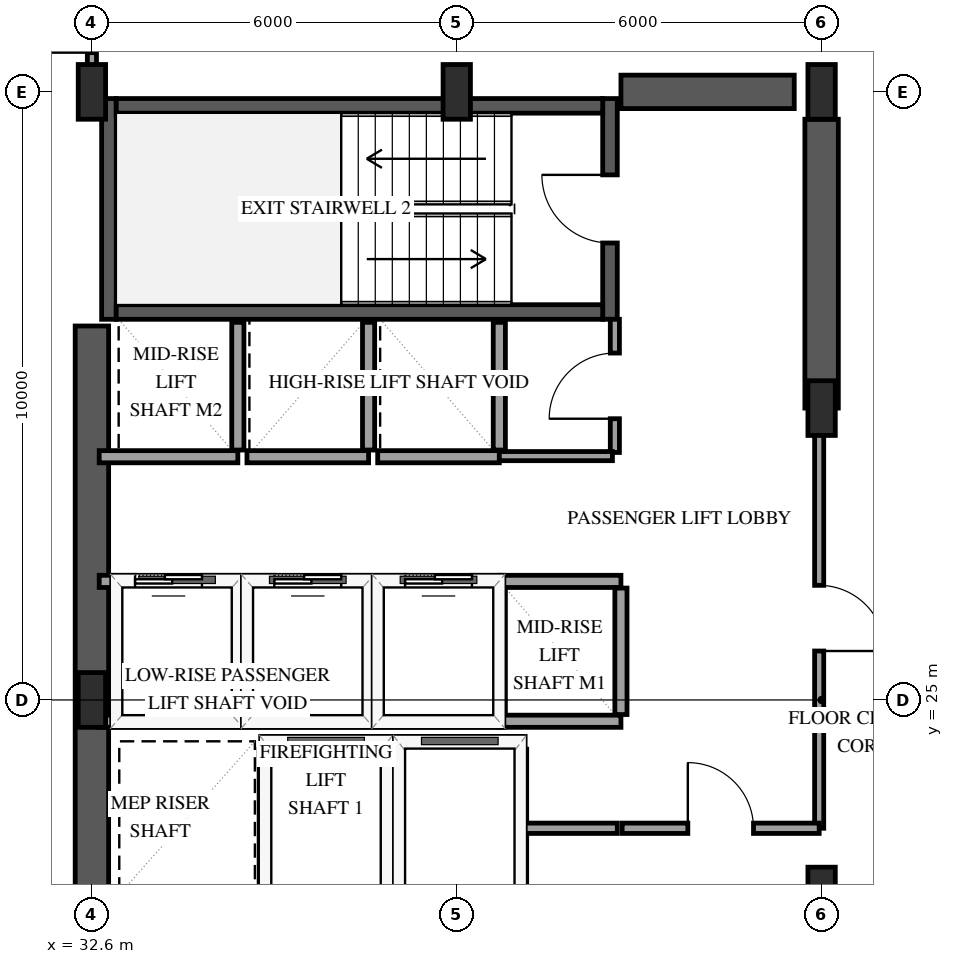
"""IFC4 building model, lengths in metres.
Left out: names, types, materials, properties, quantities, classifications, styles, units other than length and angle.
Written with IfcOpenShell. Run it as: python <this file> out.ifc"""

import sys

from ifc_helpers import new_model, si_unit, direction, frame, frame_2d, origin, origin_2d, place, context, subcontext, project, spatial, rectangle, extrude, element, fill, save


model = new_model("IFC4")
c1 = context("Model", 3, precision=1e-05, world=origin(), true_north=direction((0.0, 1.0)))
c2 = subcontext(c1, "Body", "Model", "MODEL_VIEW")
j1 = project(units=[si_unit("LENGTHUNIT", "METRE"), si_unit("PLANEANGLEUNIT", "RADIAN")], contexts=[c1])
p1 = place(None, origin())
s1 = spatial("IfcSite", under=j1, at=p1, CompositionType="ELEMENT")
p2 = place(p1, origin())
s2 = spatial("IfcBuilding", under=s1, at=p2, CompositionType="ELEMENT")
p3 = place(p2, frame((0.0, 0.0, 91.3)))
s3 = spatial("IfcBuildingStorey", under=s2, at=p3, CompositionType="ELEMENT", Elevation=91.3)
p4 = place(p3, frame((32.88, 31.26, 0.0), z_axis=(0.0, 0.0, 1.0), x_axis=(0.0, 1.0, 0.0)))
e1 = element("IfcWall", 1, at=p4, inside=s3, PredefinedType="SHEAR", context=c2, shape_type="SweptSolid", body=[
    extrude(rectangle(XDim=3.63, YDim=0.24, at=frame_2d((1.815, 0.0))), origin(), (0.0, 0.0, 1.0), 3.9),
])
p5 = place(p3, frame((41.12, 31.26, 0.0), z_axis=(0.0, 0.0, 1.0), x_axis=(0.0, 1.0, 0.0)))
e2 = element("IfcWall", 2, at=p5, inside=s3, PredefinedType="SHEAR", context=c2, shape_type="SweptSolid", body=[
    extrude(rectangle(XDim=3.63, YDim=0.24, at=frame_2d((1.815, 0.0))), origin(), (0.0, 0.0, 1.0), 3.9),
])
p6 = place(p5, frame((1.255, 0.0, 0.0)))
e3 = element("IfcOpeningElement", 3, at=p6, cuts=e2, PredefinedType="OPENING", context=c2, shape_type="SweptSolid", body=[
    extrude(rectangle(XDim=1.12, YDim=2.15, at=frame_2d((0.56, 1.075))), frame((0.0, 0.13, 0.0), z_axis=(0.0, -1.0, 0.0), x_axis=(1.0, 0.0, 0.0)), (0.0, 0.0, 1.0), 0.26),
])
for number, where, z_axis, x_axis in (
    (4, (33.0, 31.38, 0.0), (0.0, 0.0, 1.0), (1.0, 0.0, 0.0)),
    (5, (33.0, 34.77, 0.0), (0.0, 0.0, 1.0), (1.0, 0.0, 0.0)),
):
    element("IfcWall", number, at=place(p3, frame(where, z_axis=z_axis, x_axis=x_axis)), inside=s3, PredefinedType="SHEAR", context=c2, shape_type="SweptSolid", body=[
        extrude(rectangle(XDim=8.0, YDim=0.24, at=frame_2d((4.0, 0.0))), origin(), (0.0, 0.0, 1.0), 3.9),
    ])
p7 = place(p3, frame((32.6, 18.85, 0.0), z_axis=(0.0, 0.0, 1.0), x_axis=(0.0, 1.0, 0.0)))
e6 = element("IfcWall", 6, at=p7, inside=s3, PredefinedType="SHEAR", context=c2, shape_type="SweptSolid", body=[
    extrude(rectangle(XDim=12.3, YDim=0.55, at=frame_2d((6.15, 0.0))), origin(), (0.0, 0.0, 1.0), 3.9),
])
p8 = place(p3, frame((41.3, 35.0, 0.0), z_axis=(0.0, 0.0, 1.0), x_axis=(1.0, 0.0, 0.0)))
e7 = element("IfcWall", 7, at=p8, inside=s3, PredefinedType="SHEAR", context=c2, shape_type="SweptSolid", body=[
    extrude(rectangle(XDim=2.85, YDim=0.55, at=frame_2d((1.425, 0.0))), origin(), (0.0, 0.0, 1.0), 3.9),
])
p9 = place(p3, frame((44.6, 29.8, 0.0), z_axis=(0.0, 0.0, 1.0), x_axis=(0.0, 1.0, 0.0)))
e8 = element("IfcWall", 8, at=p9, inside=s3, PredefinedType="SHEAR", context=c2, shape_type="SweptSolid", body=[
    extrude(rectangle(XDim=4.75, YDim=0.55, at=frame_2d((2.375, 0.0))), origin(), (0.0, 0.0, 1.0), 3.9),
])
for number, where, z_axis, x_axis in (
    (9, (32.6, 25.0, 0.0), (0.0, 0.0, 1.0), (1.0, 0.0, 0.0)),
    (10, (32.6, 35.0, 0.0), (0.0, 0.0, 1.0), (1.0, 0.0, 0.0)),
    (11, (38.6, 35.0, 0.0), (0.0, 0.0, 1.0), (1.0, 0.0, 0.0)),
    (12, (44.6, 21.8, 0.0), (0.0, 0.0, 1.0), (1.0, 0.0, 0.0)),
    (13, (44.6, 29.8, 0.0), (0.0, 0.0, 1.0), (1.0, 0.0, 0.0)),
    (14, (44.6, 35.0, 0.0), (0.0, 0.0, 1.0), (1.0, 0.0, 0.0)),
):
    element("IfcColumn", number, at=place(p3, frame(where, z_axis=z_axis, x_axis=x_axis)), inside=s3, PredefinedType="PILASTER", context=c2, shape_type="SweptSolid", body=[
        extrude(rectangle(XDim=0.45, YDim=0.9, at=origin_2d()), origin(), (0.0, 0.0, 1.0), 3.9),
    ])
p10 = place(p3, frame((35.45, 24.3, 0.0), z_axis=(0.0, 0.0, 1.0), x_axis=(1.0, 0.0, 0.0)))
e15 = element("IfcWall", 15, at=p10, inside=s3, PredefinedType="SOLIDWALL", context=c2, shape_type="SweptSolid", body=[
    extrude(rectangle(XDim=2.0, YDim=0.2, at=frame_2d((1.0, 0.0))), origin(), (0.0, 0.0, 1.0), 3.6),
])
for number, where, z_axis, x_axis in (
    (16, (35.45, 21.81, 0.0), (0.0, 0.0, 1.0), (0.0, 1.0, 0.0)),
    (17, (37.45, 21.81, 0.0), (0.0, 0.0, 1.0), (0.0, 1.0, 0.0)),
):
    element("IfcWall", number, at=place(p3, frame(where, z_axis=z_axis, x_axis=x_axis)), inside=s3, PredefinedType="SOLIDWALL", context=c2, shape_type="SweptSolid", body=[
        extrude(rectangle(XDim=2.38, YDim=0.2, at=frame_2d((1.19, 0.0))), origin(), (0.0, 0.0, 1.0), 3.6),
    ])
p11 = place(p3, frame((37.65, 24.3, 0.0), z_axis=(0.0, 0.0, 1.0), x_axis=(1.0, 0.0, 0.0)))
e18 = element("IfcWall", 18, at=p11, inside=s3, PredefinedType="SOLIDWALL", context=c2, shape_type="SweptSolid", body=[
    extrude(rectangle(XDim=2.0, YDim=0.2, at=frame_2d((1.0, 0.0))), origin(), (0.0, 0.0, 1.0), 3.6),
])
p12 = place(p3, frame((39.65, 21.81, 0.0), z_axis=(0.0, 0.0, 1.0), x_axis=(0.0, 1.0, 0.0)))
e19 = element("IfcWall", 19, at=p12, inside=s3, PredefinedType="SOLIDWALL", context=c2, shape_type="SweptSolid", body=[
    extrude(rectangle(XDim=2.38, YDim=0.2, at=frame_2d((1.19, 0.0))), origin(), (0.0, 0.0, 1.0), 3.6),
])
p13 = place(p3, frame((32.72, 24.65, 0.0), z_axis=(0.0, 0.0, 1.0), x_axis=(1.0, 0.0, 0.0)))
e20 = element("IfcWall", 20, at=p13, inside=s3, PredefinedType="SOLIDWALL", context=c2, shape_type="SweptSolid", body=[
    extrude(rectangle(XDim=2.28, YDim=0.2, at=frame_2d((1.14, 0.0))), origin(), (0.0, 0.0, 1.0), 3.6),
])
p14 = place(p3, frame((32.72, 26.95, 0.0), z_axis=(0.0, 0.0, 1.0), x_axis=(1.0, 0.0, 0.0)))
e21 = element("IfcWall", 21, at=p14, inside=s3, PredefinedType="SOLIDWALL", context=c2, shape_type="SweptSolid", body=[
    extrude(rectangle(XDim=2.28, YDim=0.2, at=frame_2d((1.14, 0.0))), origin(), (0.0, 0.0, 1.0), 3.6),
])
p15 = place(p14, frame((0.59, 0.0, 0.0)))
e22 = element("IfcOpeningElement", 22, at=p15, cuts=e21, PredefinedType="OPENING", context=c2, shape_type="SweptSolid", body=[
    extrude(rectangle(XDim=1.1, YDim=2.15, at=frame_2d((0.55, 1.075))), frame((0.0, 0.11, 0.0), z_axis=(0.0, -1.0, 0.0), x_axis=(1.0, 0.0, 0.0)), (0.0, 0.0, 1.0), 0.22),
])
p16 = place(p3, frame((35.0, 24.76, 0.0), z_axis=(0.0, 0.0, 1.0), x_axis=(0.0, 1.0, 0.0)))
e23 = element("IfcWall", 23, at=p16, inside=s3, PredefinedType="SOLIDWALL", context=c2, shape_type="SweptSolid", body=[
    extrude(rectangle(XDim=2.08, YDim=0.2, at=frame_2d((1.04, 0.0))), origin(), (0.0, 0.0, 1.0), 3.6),
])
p17 = place(p3, frame((35.15, 24.65, 0.0), z_axis=(0.0, 0.0, 1.0), x_axis=(1.0, 0.0, 0.0)))
e24 = element("IfcWall", 24, at=p17, inside=s3, PredefinedType="SOLIDWALL", context=c2, shape_type="SweptSolid", body=[
    extrude(rectangle(XDim=2.0, YDim=0.2, at=frame_2d((1.0, 0.0))), origin(), (0.0, 0.0, 1.0), 3.6),
])
p18 = place(p3, frame((35.15, 26.95, 0.0), z_axis=(0.0, 0.0, 1.0), x_axis=(1.0, 0.0, 0.0)))
e25 = element("IfcWall", 25, at=p18, inside=s3, PredefinedType="SOLIDWALL", context=c2, shape_type="SweptSolid", body=[
    extrude(rectangle(XDim=2.0, YDim=0.2, at=frame_2d((1.0, 0.0))), origin(), (0.0, 0.0, 1.0), 3.6),
])
p19 = place(p18, frame((0.45, 0.0, 0.0)))
e26 = element("IfcOpeningElement", 26, at=p19, cuts=e25, PredefinedType="OPENING", context=c2, shape_type="SweptSolid", body=[
    extrude(rectangle(XDim=1.1, YDim=2.15, at=frame_2d((0.55, 1.075))), frame((0.0, 0.11, 0.0), z_axis=(0.0, -1.0, 0.0), x_axis=(1.0, 0.0, 0.0)), (0.0, 0.0, 1.0), 0.22),
])
p20 = place(p3, frame((37.15, 24.76, 0.0), z_axis=(0.0, 0.0, 1.0), x_axis=(0.0, 1.0, 0.0)))
e27 = element("IfcWall", 27, at=p20, inside=s3, PredefinedType="SOLIDWALL", context=c2, shape_type="SweptSolid", body=[
    extrude(rectangle(XDim=2.08, YDim=0.2, at=frame_2d((1.04, 0.0))), origin(), (0.0, 0.0, 1.0), 3.6),
])
p21 = place(p3, frame((37.3, 24.65, 0.0), z_axis=(0.0, 0.0, 1.0), x_axis=(1.0, 0.0, 0.0)))
e28 = element("IfcWall", 28, at=p21, inside=s3, PredefinedType="SOLIDWALL", context=c2, shape_type="SweptSolid", body=[
    extrude(rectangle(XDim=2.0, YDim=0.2, at=frame_2d((1.0, 0.0))), origin(), (0.0, 0.0, 1.0), 3.6),
])
p22 = place(p3, frame((37.3, 26.95, 0.0), z_axis=(0.0, 0.0, 1.0), x_axis=(1.0, 0.0, 0.0)))
e29 = element("IfcWall", 29, at=p22, inside=s3, PredefinedType="SOLIDWALL", context=c2, shape_type="SweptSolid", body=[
    extrude(rectangle(XDim=2.0, YDim=0.2, at=frame_2d((1.0, 0.0))), origin(), (0.0, 0.0, 1.0), 3.6),
])
p23 = place(p22, frame((0.45, 0.0, 0.0)))
e30 = element("IfcOpeningElement", 30, at=p23, cuts=e29, PredefinedType="OPENING", context=c2, shape_type="SweptSolid", body=[
    extrude(rectangle(XDim=1.1, YDim=2.15, at=frame_2d((0.55, 1.075))), frame((0.0, 0.11, 0.0), z_axis=(0.0, -1.0, 0.0), x_axis=(1.0, 0.0, 0.0)), (0.0, 0.0, 1.0), 0.22),
])
p24 = place(p3, frame((39.3, 24.76, 0.0), z_axis=(0.0, 0.0, 1.0), x_axis=(0.0, 1.0, 0.0)))
e31 = element("IfcWall", 31, at=p24, inside=s3, PredefinedType="SOLIDWALL", context=c2, shape_type="SweptSolid", body=[
    extrude(rectangle(XDim=2.08, YDim=0.2, at=frame_2d((1.04, 0.0))), origin(), (0.0, 0.0, 1.0), 3.6),
])
for number, where, z_axis, x_axis in (
    (32, (39.3, 24.65, 0.0), (0.0, 0.0, 1.0), (1.0, 0.0, 0.0)),
    (33, (39.3, 26.95, 0.0), (0.0, 0.0, 1.0), (1.0, 0.0, 0.0)),
):
    element("IfcWall", number, at=place(p3, frame(where, z_axis=z_axis, x_axis=x_axis)), inside=s3, PredefinedType="SOLIDWALL", context=c2, shape_type="SweptSolid", body=[
        extrude(rectangle(XDim=2.0, YDim=0.2, at=frame_2d((1.0, 0.0))), origin(), (0.0, 0.0, 1.0), 3.6),
    ])
p25 = place(p3, frame((41.3, 24.76, 0.0), z_axis=(0.0, 0.0, 1.0), x_axis=(0.0, 1.0, 0.0)))
e34 = element("IfcWall", 34, at=p25, inside=s3, PredefinedType="SOLIDWALL", context=c2, shape_type="SweptSolid", body=[
    extrude(rectangle(XDim=2.08, YDim=0.2, at=frame_2d((1.04, 0.0))), origin(), (0.0, 0.0, 1.0), 3.6),
])
p26 = place(p3, frame((32.72, 29.0, 0.0), z_axis=(0.0, 0.0, 1.0), x_axis=(1.0, 0.0, 0.0)))
e35 = element("IfcWall", 35, at=p26, inside=s3, PredefinedType="SOLIDWALL", context=c2, shape_type="SweptSolid", body=[
    extrude(rectangle(XDim=2.28, YDim=0.2, at=frame_2d((1.14, 0.0))), origin(), (0.0, 0.0, 1.0), 3.6),
])
p27 = place(p3, frame((35.0, 29.11, 0.0), z_axis=(0.0, 0.0, 1.0), x_axis=(0.0, 1.0, 0.0)))
e36 = element("IfcWall", 36, at=p27, inside=s3, PredefinedType="SOLIDWALL", context=c2, shape_type="SweptSolid", body=[
    extrude(rectangle(XDim=2.1, YDim=0.2, at=frame_2d((1.05, 0.0))), origin(), (0.0, 0.0, 1.0), 3.6),
])
p28 = place(p3, frame((35.15, 29.0, 0.0), z_axis=(0.0, 0.0, 1.0), x_axis=(1.0, 0.0, 0.0)))
e37 = element("IfcWall", 37, at=p28, inside=s3, PredefinedType="SOLIDWALL", context=c2, shape_type="SweptSolid", body=[
    extrude(rectangle(XDim=2.0, YDim=0.2, at=frame_2d((1.0, 0.0))), origin(), (0.0, 0.0, 1.0), 3.6),
])
p29 = place(p3, frame((37.15, 29.11, 0.0), z_axis=(0.0, 0.0, 1.0), x_axis=(0.0, 1.0, 0.0)))
e38 = element("IfcWall", 38, at=p29, inside=s3, PredefinedType="SOLIDWALL", context=c2, shape_type="SweptSolid", body=[
    extrude(rectangle(XDim=2.1, YDim=0.2, at=frame_2d((1.05, 0.0))), origin(), (0.0, 0.0, 1.0), 3.6),
])
p30 = place(p3, frame((37.3, 29.0, 0.0), z_axis=(0.0, 0.0, 1.0), x_axis=(1.0, 0.0, 0.0)))
e39 = element("IfcWall", 39, at=p30, inside=s3, PredefinedType="SOLIDWALL", context=c2, shape_type="SweptSolid", body=[
    extrude(rectangle(XDim=2.0, YDim=0.2, at=frame_2d((1.0, 0.0))), origin(), (0.0, 0.0, 1.0), 3.6),
])
p31 = place(p3, frame((39.3, 29.11, 0.0), z_axis=(0.0, 0.0, 1.0), x_axis=(0.0, 1.0, 0.0)))
e40 = element("IfcWall", 40, at=p31, inside=s3, PredefinedType="SOLIDWALL", context=c2, shape_type="SweptSolid", body=[
    extrude(rectangle(XDim=2.1, YDim=0.2, at=frame_2d((1.05, 0.0))), origin(), (0.0, 0.0, 1.0), 3.6),
])
p32 = place(p3, frame((44.56, 29.8, 0.0), z_axis=(0.0, 0.0, 1.0), x_axis=(0.0, -1.0, 0.0)))
e41 = element("IfcWall", 41, at=p32, inside=s3, PredefinedType="PARTITIONING", context=c2, shape_type="SweptSolid", body=[
    extrude(rectangle(XDim=6.91, YDim=0.15, at=frame_2d((3.455, 0.0))), origin(), (0.0, 0.0, 1.0), 2.64),
])
p33 = place(p32, frame((2.915, 0.0, 0.0)))
e42 = element("IfcOpeningElement", 42, at=p33, cuts=e41, PredefinedType="OPENING", context=c2, shape_type="SweptSolid", body=[
    extrude(rectangle(XDim=1.08, YDim=2.15, at=frame_2d((0.54, 1.075))), frame((0.0, 0.085, 0.0), z_axis=(0.0, -1.0, 0.0), x_axis=(1.0, 0.0, 0.0)), (0.0, 0.0, 1.0), 0.17),
])
p34 = place(p3, frame((41.32, 22.89, 0.0), z_axis=(0.0, 0.0, 1.0), x_axis=(1.0, 0.0, 0.0)))
e43 = element("IfcWall", 43, at=p34, inside=s3, PredefinedType="PARTITIONING", context=c2, shape_type="SweptSolid", body=[
    extrude(rectangle(XDim=3.24, YDim=0.17, at=frame_2d((1.62, 0.0))), origin(), (0.0, 0.0, 1.0), 3.6),
])
p35 = place(p34, frame((1.08, 0.0, 0.0)))
e44 = element("IfcOpeningElement", 44, at=p35, cuts=e43, PredefinedType="OPENING", context=c2, shape_type="SweptSolid", body=[
    extrude(rectangle(XDim=1.08, YDim=2.15, at=frame_2d((0.54, 1.075))), frame((0.0, 0.095, 0.0), z_axis=(0.0, -1.0, 0.0), x_axis=(1.0, 0.0, 0.0)), (0.0, 0.0, 1.0), 0.19),
])
p36 = place(p3, frame((41.2, 29.07, 0.0), z_axis=(0.0, 0.0, 1.0), x_axis=(0.0, 1.0, 0.0)))
e45 = element("IfcWall", 45, at=p36, inside=s3, PredefinedType="PARTITIONING", context=c2, shape_type="SweptSolid", body=[
    extrude(rectangle(XDim=2.19, YDim=0.15, at=frame_2d((1.095, 0.0))), origin(), (0.0, 0.0, 1.0), 3.6),
])
p37 = place(p36, frame((0.555, 0.0, 0.0)))
e46 = element("IfcOpeningElement", 46, at=p37, cuts=e45, PredefinedType="OPENING", context=c2, shape_type="SweptSolid", body=[
    extrude(rectangle(XDim=1.08, YDim=2.15, at=frame_2d((0.54, 1.075))), frame((0.0, 0.085, 0.0), z_axis=(0.0, -1.0, 0.0), x_axis=(1.0, 0.0, 0.0)), (0.0, 0.0, 1.0), 0.17),
])
p38 = place(p3, frame((32.6, 35.07, 0.0), z_axis=(0.0, 0.0, 1.0), x_axis=(0.0, 1.0, 0.0)))
e47 = element("IfcWall", 47, at=p38, inside=s3, PredefinedType="PARTITIONING", context=c2, shape_type="SweptSolid", body=[
    extrude(rectangle(XDim=1.91, YDim=0.15, at=frame_2d((0.955, 0.0))), origin(), (0.0, 0.0, 1.0), 3.6),
])
p39 = place(p38, frame((0.575, 0.0, 0.0)))
e48 = element("IfcOpeningElement", 48, at=p39, cuts=e47, PredefinedType="OPENING", context=c2, shape_type="SweptSolid", body=[
    extrude(rectangle(XDim=0.92, YDim=2.12, at=frame_2d((0.46, 1.06))), frame((0.0, 0.085, 0.0), z_axis=(0.0, -1.0, 0.0), x_axis=(1.0, 0.0, 0.0)), (0.0, 0.0, 1.0), 0.17),
])
p40 = place(p3, frame((39.3, 29.01, 0.0), z_axis=(0.0, 0.0, 1.0), x_axis=(1.0, 0.0, 0.0)))
e49 = element("IfcWall", 49, at=p40, inside=s3, PredefinedType="PARTITIONING", context=c2, shape_type="SweptSolid", body=[
    extrude(rectangle(XDim=1.86, YDim=0.15, at=frame_2d((0.93, 0.0))), origin(), (0.0, 0.0, 1.0), 3.6),
])
p41 = place(p3, frame((39.72, 22.89, 0.0), z_axis=(0.0, 0.0, 1.0), x_axis=(1.0, 0.0, 0.0)))
e50 = element("IfcWall", 50, at=p41, inside=s3, PredefinedType="PARTITIONING", context=c2, shape_type="SweptSolid", body=[
    extrude(rectangle(XDim=1.52, YDim=0.17, at=frame_2d((0.76, 0.0))), origin(), (0.0, 0.0, 1.0), 3.6),
])
p42 = place(p15, origin())
e51 = element("IfcDoor", 51, at=p42, inside=s3, OperationType="SLIDING_TO_LEFT", PredefinedType="DOOR", context=c2, shape_type="SweptSolid", body=[
    extrude(rectangle(XDim=1.1, YDim=2.15, at=frame_2d((0.55, 1.075))), frame((0.0, 0.025, 0.0), z_axis=(0.0, -1.0, 0.0), x_axis=(1.0, 0.0, 0.0)), (0.0, 0.0, 1.0), 0.05),
])
fill(e22, e51)
p43 = place(p19, origin())
e52 = element("IfcDoor", 52, at=p43, inside=s3, OperationType="SLIDING_TO_LEFT", PredefinedType="DOOR", context=c2, shape_type="SweptSolid", body=[
    extrude(rectangle(XDim=1.1, YDim=2.15, at=frame_2d((0.55, 1.075))), frame((0.0, 0.025, 0.0), z_axis=(0.0, -1.0, 0.0), x_axis=(1.0, 0.0, 0.0)), (0.0, 0.0, 1.0), 0.05),
])
fill(e26, e52)
p44 = place(p23, origin())
e53 = element("IfcDoor", 53, at=p44, inside=s3, OperationType="SLIDING_TO_LEFT", PredefinedType="DOOR", context=c2, shape_type="SweptSolid", body=[
    extrude(rectangle(XDim=1.1, YDim=2.15, at=frame_2d((0.55, 1.075))), frame((0.0, 0.025, 0.0), z_axis=(0.0, -1.0, 0.0), x_axis=(1.0, 0.0, 0.0)), (0.0, 0.0, 1.0), 0.05),
])
fill(e30, e53)
p45 = place(p6, origin())
e54 = element("IfcDoor", 54, at=p45, inside=s3, OperationType="SINGLE_SWING_RIGHT", PredefinedType="DOOR", context=c2, shape_type="SweptSolid", body=[
    extrude(rectangle(XDim=1.12, YDim=2.15, at=frame_2d((0.56, 1.075))), frame((0.0, 0.025, 0.0), z_axis=(0.0, -1.0, 0.0), x_axis=(1.0, 0.0, 0.0)), (0.0, 0.0, 1.0), 0.05),
])
fill(e3, e54)
p46 = place(p33, origin())
e55 = element("IfcDoor", 55, at=p46, inside=s3, OperationType="SINGLE_SWING_RIGHT", PredefinedType="DOOR", context=c2, shape_type="SweptSolid", body=[
    extrude(rectangle(XDim=1.08, YDim=2.15, at=frame_2d((0.54, 1.075))), frame((0.0, 0.025, 0.0), z_axis=(0.0, -1.0, 0.0), x_axis=(1.0, 0.0, 0.0)), (0.0, 0.0, 1.0), 0.05),
])
fill(e42, e55)
p47 = place(p35, origin())
e56 = element("IfcDoor", 56, at=p47, inside=s3, OperationType="SINGLE_SWING_LEFT", PredefinedType="DOOR", context=c2, shape_type="SweptSolid", body=[
    extrude(rectangle(XDim=1.08, YDim=2.15, at=frame_2d((0.54, 1.075))), frame((0.0, 0.025, 0.0), z_axis=(0.0, -1.0, 0.0), x_axis=(1.0, 0.0, 0.0)), (0.0, 0.0, 1.0), 0.05),
])
fill(e44, e56)
p48 = place(p37, origin())
e57 = element("IfcDoor", 57, at=p48, inside=s3, OperationType="SINGLE_SWING_LEFT", PredefinedType="DOOR", context=c2, shape_type="SweptSolid", body=[
    extrude(rectangle(XDim=1.08, YDim=2.15, at=frame_2d((0.54, 1.075))), frame((0.0, 0.025, 0.0), z_axis=(0.0, -1.0, 0.0), x_axis=(1.0, 0.0, 0.0)), (0.0, 0.0, 1.0), 0.05),
])
fill(e46, e57)
p49 = place(p39, origin())
e58 = element("IfcDoor", 58, at=p49, inside=s3, OperationType="SINGLE_SWING_LEFT", PredefinedType="DOOR", context=c2, shape_type="SweptSolid", body=[
    extrude(rectangle(XDim=0.92, YDim=2.12, at=frame_2d((0.46, 1.06))), frame((0.0, 0.025, 0.0), z_axis=(0.0, -1.0, 0.0), x_axis=(1.0, 0.0, 0.0)), (0.0, 0.0, 1.0), 0.05),
])
fill(e48, e58)
save(model, sys.argv[1])
